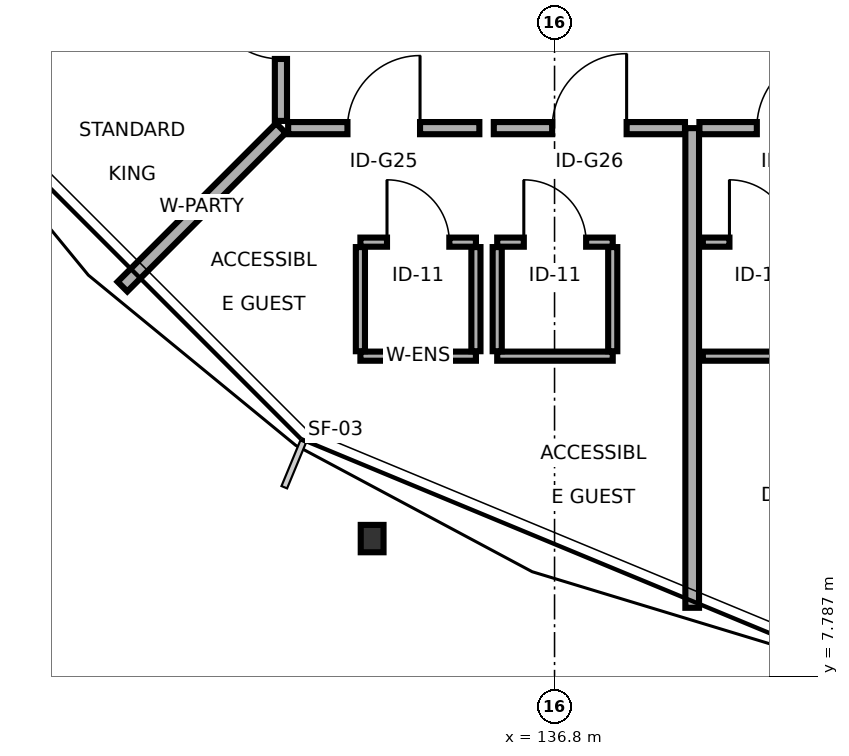
"""IFC4 building model, lengths in metres.
Left out: names, types, materials, properties, quantities, classifications, styles, units other than length and angle.
Written with IfcOpenShell. Run it as: python <this file> out.ifc"""

import sys

from ifc_helpers import new_model, si_unit, direction, frame, frame_2d, origin, origin_2d, place, context, subcontext, project, spatial, rectangle, i_section, extrude, element, fill, save


model = new_model("IFC4")
c1 = context("Model", 3, precision=1e-05, world=origin(), true_north=direction((0.0, 1.0)))
c2 = subcontext(c1, "Body", "Model", "MODEL_VIEW")
j1 = project(units=[si_unit("LENGTHUNIT", "METRE"), si_unit("PLANEANGLEUNIT", "RADIAN")], contexts=[c1])
p1 = place(None, origin())
s1 = spatial("IfcSite", under=j1, at=p1, CompositionType="ELEMENT")
p2 = place(p1, origin())
s2 = spatial("IfcBuilding", under=s1, at=p2, CompositionType="ELEMENT")
p3 = place(p2, frame((0.0, 0.0, 38.5)))
s3 = spatial("IfcBuildingStorey", under=s2, at=p3, CompositionType="ELEMENT", Elevation=38.5)
p4 = place(p3, frame((134.4, 9.6, 0.0), z_axis=(0.0, 0.0, 1.0), x_axis=(1.0, 0.0, 0.0)))
e1 = element("IfcColumn", 1, at=p4, inside=s3, PredefinedType="COLUMN", context=c2, shape_type="SweptSolid", body=[
    extrude(i_section(OverallWidth=0.3, OverallDepth=0.36, WebThickness=0.012, FlangeThickness=0.022, FilletRadius=0.027, at=origin_2d()), origin(), (0.0, 0.0, 1.0), 3.4),
])
p5 = place(p3, frame((133.295, 15.0, 0.0), z_axis=(0.0, 0.0, 1.0), x_axis=(1.0, 0.0, 0.0)))
e2 = element("IfcWall", 2, at=p5, inside=s3, PredefinedType="PARTITIONING", context=c2, shape_type="SweptSolid", body=[
    extrude(rectangle(XDim=2.516, YDim=0.16, at=frame_2d((1.258, 0.0))), origin(), (0.0, 0.0, 1.0), 3.15),
])
p6 = place(p5, frame((0.78, 0.0, 0.0)))
e3 = element("IfcOpeningElement", 3, at=p6, cuts=e2, PredefinedType="OPENING", context=c2, shape_type="SweptSolid", body=[
    extrude(rectangle(XDim=0.955, YDim=2.17, at=frame_2d((0.478, 1.085))), frame((0.0, 0.09, 0.0), z_axis=(0.0, -1.0, 0.0), x_axis=(1.0, 0.0, 0.0)), (0.0, 0.0, 1.0), 0.18),
])
p7 = place(p3, frame((134.246, 12.0, 0.0), z_axis=(0.0, 0.0, 1.0), x_axis=(1.0, 0.0, 0.0)))
e4 = element("IfcWall", 4, at=p7, inside=s3, PredefinedType="PARTITIONING", context=c2, shape_type="SweptSolid", body=[
    extrude(rectangle(XDim=1.52, YDim=0.12, at=frame_2d((0.76, 0.0))), origin(), (0.0, 0.0, 1.0), 2.735),
])
p8 = place(p3, frame((134.246, 13.5, 0.0), z_axis=(0.0, 0.0, 1.0), x_axis=(1.0, 0.0, 0.0)))
e5 = element("IfcWall", 5, at=p8, inside=s3, PredefinedType="PARTITIONING", context=c2, shape_type="SweptSolid", body=[
    extrude(rectangle(XDim=1.52, YDim=0.12, at=frame_2d((0.76, 0.0))), origin(), (0.0, 0.0, 1.0), 2.735),
])
p9 = place(p8, frame((0.35, 0.0, 0.0)))
e6 = element("IfcOpeningElement", 6, at=p9, cuts=e5, PredefinedType="OPENING", context=c2, shape_type="SweptSolid", body=[
    extrude(rectangle(XDim=0.82, YDim=2.08, at=frame_2d((0.41, 1.04))), frame((0.0, 0.07, 0.0), z_axis=(0.0, -1.0, 0.0), x_axis=(1.0, 0.0, 0.0)), (0.0, 0.0, 1.0), 0.14),
])
p10 = place(p3, frame((134.246, 12.065, 0.0), z_axis=(0.0, 0.0, 1.0), x_axis=(0.0, 1.0, 0.0)))
e7 = element("IfcWall", 7, at=p10, inside=s3, PredefinedType="PARTITIONING", context=c2, shape_type="SweptSolid", body=[
    extrude(rectangle(XDim=1.37, YDim=0.12, at=frame_2d((0.685, 0.0))), origin(), (0.0, 0.0, 1.0), 3.15),
])
p11 = place(p3, frame((135.766, 12.065, 0.0), z_axis=(0.0, 0.0, 1.0), x_axis=(0.0, 1.0, 0.0)))
e8 = element("IfcWall", 8, at=p11, inside=s3, PredefinedType="PARTITIONING", context=c2, shape_type="SweptSolid", body=[
    extrude(rectangle(XDim=1.37, YDim=0.12, at=frame_2d((0.685, 0.0))), origin(), (0.0, 0.0, 1.0), 2.735),
])
p12 = place(p3, frame((133.2, 15.0, 0.0), z_axis=(0.0, 0.0, 1.0), x_axis=(-0.707106781187, -0.707106781187, 0.0)))
e9 = element("IfcWall", 9, at=p12, inside=s3, PredefinedType="PARTITIONING", context=c2, shape_type="SweptSolid", body=[
    extrude(rectangle(XDim=2.948, YDim=0.18, at=frame_2d((1.474, 0.0))), origin(), (0.0, 0.0, 1.0), 2.695),
])
p13 = place(p3, frame((136.0, 15.0, 0.0), z_axis=(0.0, 0.0, 1.0), x_axis=(1.0, 0.0, 0.0)))
e10 = element("IfcWall", 10, at=p13, inside=s3, PredefinedType="PARTITIONING", context=c2, shape_type="SweptSolid", body=[
    extrude(rectangle(XDim=2.516, YDim=0.16, at=frame_2d((1.258, 0.0))), origin(), (0.0, 0.0, 1.0), 2.735),
])
p14 = place(p13, frame((0.768, 0.0, 0.0)))
e11 = element("IfcOpeningElement", 11, at=p14, cuts=e10, PredefinedType="OPENING", context=c2, shape_type="SweptSolid", body=[
    extrude(rectangle(XDim=0.98, YDim=2.17, at=frame_2d((0.49, 1.085))), frame((0.0, 0.09, 0.0), z_axis=(0.0, -1.0, 0.0), x_axis=(1.0, 0.0, 0.0)), (0.0, 0.0, 1.0), 0.18),
])
p15 = place(p3, frame((136.046, 12.0, 0.0), z_axis=(0.0, 0.0, 1.0), x_axis=(1.0, 0.0, 0.0)))
e12 = element("IfcWall", 12, at=p15, inside=s3, PredefinedType="PARTITIONING", context=c2, shape_type="SweptSolid", body=[
    extrude(rectangle(XDim=1.52, YDim=0.12, at=frame_2d((0.76, 0.0))), origin(), (0.0, 0.0, 1.0), 3.15),
])
p16 = place(p3, frame((136.046, 13.5, 0.0), z_axis=(0.0, 0.0, 1.0), x_axis=(1.0, 0.0, 0.0)))
e13 = element("IfcWall", 13, at=p16, inside=s3, PredefinedType="PARTITIONING", context=c2, shape_type="SweptSolid", body=[
    extrude(rectangle(XDim=1.52, YDim=0.12, at=frame_2d((0.76, 0.0))), origin(), (0.0, 0.0, 1.0), 3.15),
])
p17 = place(p16, frame((0.35, 0.0, 0.0)))
e14 = element("IfcOpeningElement", 14, at=p17, cuts=e13, PredefinedType="OPENING", context=c2, shape_type="SweptSolid", body=[
    extrude(rectangle(XDim=0.82, YDim=2.08, at=frame_2d((0.41, 1.04))), frame((0.0, 0.07, 0.0), z_axis=(0.0, -1.0, 0.0), x_axis=(1.0, 0.0, 0.0)), (0.0, 0.0, 1.0), 0.14),
])
for number, where, z_axis, x_axis in (
    (15, (136.046, 12.065, 0.0), (0.0, 0.0, 1.0), (0.0, 1.0, 0.0)),
    (16, (137.566, 12.065, 0.0), (0.0, 0.0, 1.0), (0.0, 1.0, 0.0)),
):
    element("IfcWall", number, at=place(p3, frame(where, z_axis=z_axis, x_axis=x_axis)), inside=s3, PredefinedType="PARTITIONING", context=c2, shape_type="SweptSolid", body=[
        extrude(rectangle(XDim=1.37, YDim=0.12, at=frame_2d((0.685, 0.0))), origin(), (0.0, 0.0, 1.0), 3.15),
    ])
p18 = place(p3, frame((138.611, 8.689, 0.0), z_axis=(0.0, 0.0, 1.0), x_axis=(0.0, 1.0, 0.0)))
e17 = element("IfcWall", 17, at=p18, inside=s3, PredefinedType="PARTITIONING", context=c2, shape_type="SweptSolid", body=[
    extrude(rectangle(XDim=6.311, YDim=0.18, at=frame_2d((3.155, 0.0))), origin(), (0.0, 0.0, 1.0), 2.695),
])
p19 = place(p3, frame((138.706, 15.0, 0.0), z_axis=(0.0, 0.0, 1.0), x_axis=(1.0, 0.0, 0.0)))
e18 = element("IfcWall", 18, at=p19, inside=s3, PredefinedType="PARTITIONING", context=c2, shape_type="SweptSolid", body=[
    extrude(rectangle(XDim=2.516, YDim=0.16, at=frame_2d((1.258, 0.0))), origin(), (0.0, 0.0, 1.0), 3.15),
])
p20 = place(p19, frame((0.755, 0.0, 0.0)))
e19 = element("IfcOpeningElement", 19, at=p20, cuts=e18, PredefinedType="OPENING", context=c2, shape_type="SweptSolid", body=[
    extrude(rectangle(XDim=1.005, YDim=2.17, at=frame_2d((0.502, 1.085))), frame((0.0, 0.09, 0.0), z_axis=(0.0, -1.0, 0.0), x_axis=(1.0, 0.0, 0.0)), (0.0, 0.0, 1.0), 0.18),
])
p21 = place(p3, frame((138.751, 12.0, 0.0), z_axis=(0.0, 0.0, 1.0), x_axis=(1.0, 0.0, 0.0)))
e20 = element("IfcWall", 20, at=p21, inside=s3, PredefinedType="PARTITIONING", context=c2, shape_type="SweptSolid", body=[
    extrude(rectangle(XDim=1.52, YDim=0.12, at=frame_2d((0.76, 0.0))), origin(), (0.0, 0.0, 1.0), 3.15),
])
p22 = place(p3, frame((138.751, 13.5, 0.0), z_axis=(0.0, 0.0, 1.0), x_axis=(1.0, 0.0, 0.0)))
e21 = element("IfcWall", 21, at=p22, inside=s3, PredefinedType="PARTITIONING", context=c2, shape_type="SweptSolid", body=[
    extrude(rectangle(XDim=1.52, YDim=0.12, at=frame_2d((0.76, 0.0))), origin(), (0.0, 0.0, 1.0), 3.15),
])
p23 = place(p22, frame((0.35, 0.0, 0.0)))
e22 = element("IfcOpeningElement", 22, at=p23, cuts=e21, PredefinedType="OPENING", context=c2, shape_type="SweptSolid", body=[
    extrude(rectangle(XDim=0.82, YDim=2.08, at=frame_2d((0.41, 1.04))), frame((0.0, 0.07, 0.0), z_axis=(0.0, -1.0, 0.0), x_axis=(1.0, 0.0, 0.0)), (0.0, 0.0, 1.0), 0.14),
])
p24 = place(p3, frame((133.2, 15.095, 0.0), z_axis=(0.0, 0.0, 1.0), x_axis=(0.0, 1.0, 0.0)))
e23 = element("IfcWall", 23, at=p24, inside=s3, PredefinedType="PARTITIONING", context=c2, shape_type="SweptSolid", body=[
    extrude(rectangle(XDim=2.61, YDim=0.16, at=frame_2d((1.305, 0.0))), origin(), (0.0, 0.0, 1.0), 2.735),
])
p25 = place(p24, frame((0.815, 0.0, 0.0)))
e24 = element("IfcOpeningElement", 24, at=p25, cuts=e23, PredefinedType="OPENING", context=c2, shape_type="SweptSolid", body=[
    extrude(rectangle(XDim=0.98, YDim=2.11, at=frame_2d((0.49, 1.055))), frame((0.0, 0.09, 0.0), z_axis=(0.0, -1.0, 0.0), x_axis=(1.0, 0.0, 0.0)), (0.0, 0.0, 1.0), 0.18),
])
p26 = place(p6, origin())
e25 = element("IfcDoor", 25, at=p26, inside=s3, OperationType="SINGLE_SWING_RIGHT", PredefinedType="DOOR", context=c2, shape_type="SweptSolid", body=[
    extrude(rectangle(XDim=0.955, YDim=2.17, at=frame_2d((0.478, 1.085))), frame((0.0, 0.025, 0.0), z_axis=(0.0, -1.0, 0.0), x_axis=(1.0, 0.0, 0.0)), (0.0, 0.0, 1.0), 0.05),
])
fill(e3, e25)
p27 = place(p9, origin())
e26 = element("IfcDoor", 26, at=p27, inside=s3, OperationType="SINGLE_SWING_LEFT", PredefinedType="DOOR", context=c2, shape_type="SweptSolid", body=[
    extrude(rectangle(XDim=0.82, YDim=2.08, at=frame_2d((0.41, 1.04))), frame((0.0, 0.025, 0.0), z_axis=(0.0, -1.0, 0.0), x_axis=(1.0, 0.0, 0.0)), (0.0, 0.0, 1.0), 0.05),
])
fill(e6, e26)
p28 = place(p14, origin())
e27 = element("IfcDoor", 27, at=p28, inside=s3, OperationType="SINGLE_SWING_RIGHT", PredefinedType="DOOR", context=c2, shape_type="SweptSolid", body=[
    extrude(rectangle(XDim=0.98, YDim=2.17, at=frame_2d((0.49, 1.085))), frame((0.0, 0.025, 0.0), z_axis=(0.0, -1.0, 0.0), x_axis=(1.0, 0.0, 0.0)), (0.0, 0.0, 1.0), 0.05),
])
fill(e11, e27)
p29 = place(p17, origin())
e28 = element("IfcDoor", 28, at=p29, inside=s3, OperationType="SINGLE_SWING_LEFT", PredefinedType="DOOR", context=c2, shape_type="SweptSolid", body=[
    extrude(rectangle(XDim=0.82, YDim=2.08, at=frame_2d((0.41, 1.04))), frame((0.0, 0.025, 0.0), z_axis=(0.0, -1.0, 0.0), x_axis=(1.0, 0.0, 0.0)), (0.0, 0.0, 1.0), 0.05),
])
fill(e14, e28)
p30 = place(p20, origin())
e29 = element("IfcDoor", 29, at=p30, inside=s3, OperationType="SINGLE_SWING_RIGHT", PredefinedType="DOOR", context=c2, shape_type="SweptSolid", body=[
    extrude(rectangle(XDim=1.005, YDim=2.17, at=frame_2d((0.502, 1.085))), frame((0.0, 0.025, 0.0), z_axis=(0.0, -1.0, 0.0), x_axis=(1.0, 0.0, 0.0)), (0.0, 0.0, 1.0), 0.05),
])
fill(e19, e29)
p31 = place(p23, origin())
e30 = element("IfcDoor", 30, at=p31, inside=s3, OperationType="SINGLE_SWING_LEFT", PredefinedType="DOOR", context=c2, shape_type="SweptSolid", body=[
    extrude(rectangle(XDim=0.82, YDim=2.08, at=frame_2d((0.41, 1.04))), frame((0.0, 0.025, 0.0), z_axis=(0.0, -1.0, 0.0), x_axis=(1.0, 0.0, 0.0)), (0.0, 0.0, 1.0), 0.05),
])
fill(e22, e30)
p32 = place(p25, origin())
e31 = element("IfcDoor", 31, at=p32, inside=s3, OperationType="SINGLE_SWING_RIGHT", PredefinedType="DOOR", context=c2, shape_type="SweptSolid", body=[
    extrude(rectangle(XDim=0.98, YDim=2.11, at=frame_2d((0.49, 1.055))), frame((0.0, 0.025, 0.0), z_axis=(0.0, -1.0, 0.0), x_axis=(1.0, 0.0, 0.0)), (0.0, 0.0, 1.0), 0.05),
])
fill(e24, e31)
save(model, sys.argv[1])
